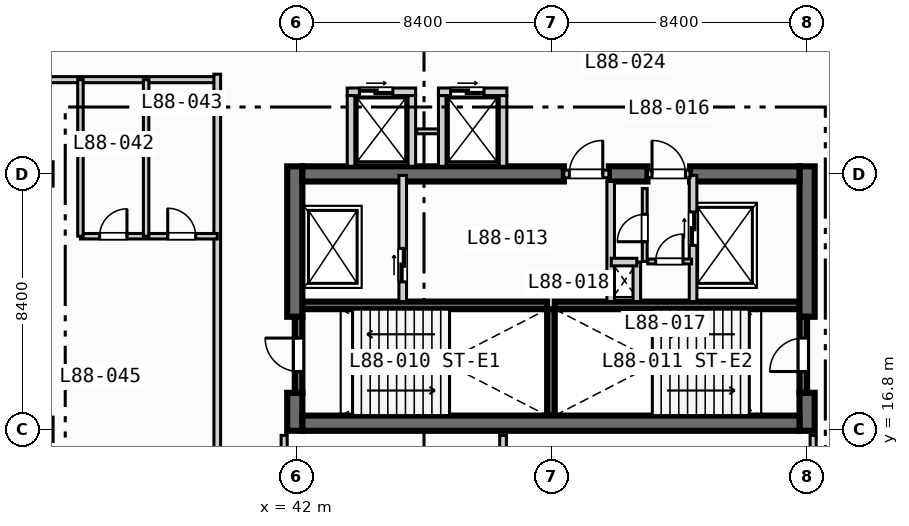
"""IFC4 building model, lengths in metres.
Left out: names, types, materials, properties, quantities, classifications, styles, units other than length and angle.
Written with IfcOpenShell. Run it as: python <this file> out.ifc"""

import sys

from ifc_helpers import new_model, si_unit, direction, frame, frame_2d, origin, place, context, subcontext, project, spatial, rectangle, extrude, element, fill, save


model = new_model("IFC4")
c1 = context("Model", 3, precision=1e-05, world=origin(), true_north=direction((0.0, 1.0)))
c2 = subcontext(c1, "Body", "Model", "MODEL_VIEW")
j1 = project(units=[si_unit("LENGTHUNIT", "METRE"), si_unit("PLANEANGLEUNIT", "RADIAN")], contexts=[c1])
p1 = place(None, origin())
s1 = spatial("IfcSite", under=j1, at=p1, CompositionType="ELEMENT")
p2 = place(p1, origin())
s2 = spatial("IfcBuilding", under=s1, at=p2, CompositionType="ELEMENT")
p3 = place(p2, frame((0.0, 0.0, 355.4)))
s3 = spatial("IfcBuildingStorey", under=s2, at=p3, CompositionType="ELEMENT", Elevation=355.4)
for number, where, z_axis, x_axis in (
    (1, (42.2, 20.875, 0.0), (0.0, 0.0, 1.0), (1.0, 0.0, 0.0)),
    (2, (50.5, 20.875, 0.0), (0.0, 0.0, 1.0), (1.0, 0.0, 0.0)),
):
    element("IfcWall", number, at=place(p3, frame(where, z_axis=z_axis, x_axis=x_axis)), inside=s3, PredefinedType="SOLIDWALL", context=c2, shape_type="SweptSolid", body=[
        extrude(rectangle(XDim=8.05, YDim=0.25, at=frame_2d((4.025, 0.0))), origin(), (0.0, 0.0, 1.0), 3.97),
    ])
p4 = place(p3, frame((50.375, 17.25, 0.0), z_axis=(0.0, 0.0, 1.0), x_axis=(0.0, 1.0, 0.0)))
e3 = element("IfcWall", 3, at=p4, inside=s3, PredefinedType="SOLIDWALL", context=c2, shape_type="SweptSolid", body=[
    extrude(rectangle(XDim=3.5, YDim=0.25, at=frame_2d((1.75, 0.0))), origin(), (0.0, 0.0, 1.0), 3.97),
])
p5 = place(p3, frame((41.95, 16.75, 0.0), z_axis=(0.0, 0.0, 1.0), x_axis=(0.0, 1.0, 0.0)))
e4 = element("IfcWall", 4, at=p5, inside=s3, PredefinedType="SHEAR", context=c2, shape_type="SweptSolid", body=[
    extrude(rectangle(XDim=1.25, YDim=0.5, at=frame_2d((0.625, 0.0))), origin(), (0.0, 0.0, 1.0), 3.97),
])
p6 = place(p3, frame((41.95, 20.5, 0.0), z_axis=(0.0, 0.0, 1.0), x_axis=(0.0, 1.0, 0.0)))
e5 = element("IfcWall", 5, at=p6, inside=s3, PredefinedType="SHEAR", context=c2, shape_type="SweptSolid", body=[
    extrude(rectangle(XDim=4.95, YDim=0.5, at=frame_2d((2.475, 0.0))), origin(), (0.0, 0.0, 1.0), 3.97),
])
p7 = place(p3, frame((58.8, 16.75, 0.0), z_axis=(0.0, 0.0, 1.0), x_axis=(0.0, 1.0, 0.0)))
e6 = element("IfcWall", 6, at=p7, inside=s3, PredefinedType="SHEAR", context=c2, shape_type="SweptSolid", body=[
    extrude(rectangle(XDim=1.25, YDim=0.5, at=frame_2d((0.625, 0.0))), origin(), (0.0, 0.0, 1.0), 3.97),
])
p8 = place(p3, frame((58.8, 20.5, 0.0), z_axis=(0.0, 0.0, 1.0), x_axis=(0.0, 1.0, 0.0)))
e7 = element("IfcWall", 7, at=p8, inside=s3, PredefinedType="SHEAR", context=c2, shape_type="SweptSolid", body=[
    extrude(rectangle(XDim=4.95, YDim=0.5, at=frame_2d((2.475, 0.0))), origin(), (0.0, 0.0, 1.0), 3.97),
])
p9 = place(p3, frame((42.2, 17.0, 0.0), z_axis=(0.0, 0.0, 1.0), x_axis=(1.0, 0.0, 0.0)))
e8 = element("IfcWall", 8, at=p9, inside=s3, PredefinedType="SHEAR", context=c2, shape_type="SweptSolid", body=[
    extrude(rectangle(XDim=16.35, YDim=0.5, at=frame_2d((8.175, 0.0))), origin(), (0.0, 0.0, 1.0), 3.97),
])
p10 = place(p3, frame((42.2, 25.2, 0.0), z_axis=(0.0, 0.0, 1.0), x_axis=(1.0, 0.0, 0.0)))
e9 = element("IfcWall", 9, at=p10, inside=s3, PredefinedType="SHEAR", context=c2, shape_type="SweptSolid", body=[
    extrude(rectangle(XDim=8.6, YDim=0.5, at=frame_2d((4.3, 0.0))), origin(), (0.0, 0.0, 1.0), 3.97),
])
p11 = place(p3, frame((52.28, 25.2, 0.0), z_axis=(0.0, 0.0, 1.0), x_axis=(1.0, 0.0, 0.0)))
e10 = element("IfcWall", 10, at=p11, inside=s3, PredefinedType="SHEAR", context=c2, shape_type="SweptSolid", body=[
    extrude(rectangle(XDim=1.27, YDim=0.5, at=frame_2d((0.635, 0.0))), origin(), (0.0, 0.0, 1.0), 3.97),
])
p12 = place(p3, frame((54.95, 25.2, 0.0), z_axis=(0.0, 0.0, 1.0), x_axis=(1.0, 0.0, 0.0)))
e11 = element("IfcWall", 11, at=p12, inside=s3, PredefinedType="SHEAR", context=c2, shape_type="SweptSolid", body=[
    extrude(rectangle(XDim=3.6, YDim=0.5, at=frame_2d((1.8, 0.0))), origin(), (0.0, 0.0, 1.0), 3.97),
])
p13 = place(p3, frame((42.075, 18.0, 0.0), z_axis=(0.0, 0.0, 1.0), x_axis=(0.0, 1.0, 0.0)))
e12 = element("IfcWall", 12, at=p13, inside=s3, PredefinedType="SOLIDWALL", context=c2, shape_type="SweptSolid", body=[
    extrude(rectangle(XDim=2.5, YDim=0.25, at=frame_2d((1.25, 0.0))), origin(), (0.0, 0.0, 1.0), 3.97),
])
p14 = place(p13, frame((0.7, 0.0, 0.0)))
e13 = element("IfcOpeningElement", 13, at=p14, cuts=e12, PredefinedType="OPENING", context=c2, shape_type="SweptSolid", body=[
    extrude(rectangle(XDim=1.1, YDim=2.15, at=frame_2d((0.55, 1.075))), frame((0.0, 0.135, 0.0), z_axis=(0.0, -1.0, 0.0), x_axis=(1.0, 0.0, 0.0)), (0.0, 0.0, 1.0), 0.27),
])
p15 = place(p3, frame((58.675, 18.0, 0.0), z_axis=(0.0, 0.0, 1.0), x_axis=(0.0, 1.0, 0.0)))
e14 = element("IfcWall", 14, at=p15, inside=s3, PredefinedType="SOLIDWALL", context=c2, shape_type="SweptSolid", body=[
    extrude(rectangle(XDim=2.5, YDim=0.25, at=frame_2d((1.25, 0.0))), origin(), (0.0, 0.0, 1.0), 3.97),
])
p16 = place(p15, frame((0.7, 0.0, 0.0)))
e15 = element("IfcOpeningElement", 15, at=p16, cuts=e14, PredefinedType="OPENING", context=c2, shape_type="SweptSolid", body=[
    extrude(rectangle(XDim=1.1, YDim=2.15, at=frame_2d((0.55, 1.075))), frame((0.0, 0.135, 0.0), z_axis=(0.0, -1.0, 0.0), x_axis=(1.0, 0.0, 0.0)), (0.0, 0.0, 1.0), 0.27),
])
p17 = place(p3, frame((45.5, 21.0, 0.0), z_axis=(0.0, 0.0, 1.0), x_axis=(0.0, 1.0, 0.0)))
e16 = element("IfcWall", 16, at=p17, inside=s3, PredefinedType="SOLIDWALL", context=c2, shape_type="SweptSolid", body=[
    extrude(rectangle(XDim=4.15, YDim=0.25, at=frame_2d((2.075, 0.0))), origin(), (0.0, 0.0, 1.0), 3.97),
])
p18 = place(p17, frame((0.65, 0.0, 0.0)))
e17 = element("IfcOpeningElement", 17, at=p18, cuts=e16, PredefinedType="OPENING", context=c2, shape_type="SweptSolid", body=[
    extrude(rectangle(XDim=1.1, YDim=2.15, at=frame_2d((0.55, 1.075))), frame((0.0, 0.135, 0.0), z_axis=(0.0, -1.0, 0.0), x_axis=(1.0, 0.0, 0.0)), (0.0, 0.0, 1.0), 0.27),
])
p19 = place(p3, frame((50.8, 25.2, 0.0), z_axis=(0.0, 0.0, 1.0), x_axis=(1.0, 0.0, 0.0)))
e18 = element("IfcWall", 18, at=p19, inside=s3, PredefinedType="SOLIDWALL", context=c2, shape_type="SweptSolid", body=[
    extrude(rectangle(XDim=1.48, YDim=0.25, at=frame_2d((0.74, 0.0))), origin(), (0.0, 0.0, 1.0), 3.97),
])
p20 = place(p19, frame((0.18, 0.0, 0.0)))
e19 = element("IfcOpeningElement", 19, at=p20, cuts=e18, PredefinedType="OPENING", context=c2, shape_type="SweptSolid", body=[
    extrude(rectangle(XDim=1.1, YDim=2.15, at=frame_2d((0.55, 1.075))), frame((0.0, 0.135, 0.0), z_axis=(0.0, -1.0, 0.0), x_axis=(1.0, 0.0, 0.0)), (0.0, 0.0, 1.0), 0.27),
])
p21 = place(p3, frame((52.34, 21.0, 0.0), z_axis=(0.0, 0.0, 1.0), x_axis=(0.0, 1.0, 0.0)))
e20 = element("IfcWall", 20, at=p21, inside=s3, PredefinedType="SOLIDWALL", context=c2, shape_type="SweptSolid", body=[
    extrude(rectangle(XDim=3.95, YDim=0.25, at=frame_2d((1.975, 0.0))), origin(), (0.0, 0.0, 1.0), 3.97),
])
p22 = place(p3, frame((55.05, 21.0, 0.0), z_axis=(0.0, 0.0, 1.0), x_axis=(0.0, 1.0, 0.0)))
e21 = element("IfcWall", 21, at=p22, inside=s3, PredefinedType="SOLIDWALL", context=c2, shape_type="SweptSolid", body=[
    extrude(rectangle(XDim=4.15, YDim=0.25, at=frame_2d((2.075, 0.0))), origin(), (0.0, 0.0, 1.0), 3.97),
])
p23 = place(p22, frame((1.85, 0.0, 0.0)))
e22 = element("IfcOpeningElement", 22, at=p23, cuts=e21, PredefinedType="OPENING", context=c2, shape_type="SweptSolid", body=[
    extrude(rectangle(XDim=1.1, YDim=2.15, at=frame_2d((0.55, 1.075))), frame((0.0, 0.135, 0.0), z_axis=(0.0, -1.0, 0.0), x_axis=(1.0, 0.0, 0.0)), (0.0, 0.0, 1.0), 0.27),
])
p24 = place(p3, frame((53.55, 25.2, 0.0), z_axis=(0.0, 0.0, 1.0), x_axis=(1.0, 0.0, 0.0)))
e23 = element("IfcWall", 23, at=p24, inside=s3, PredefinedType="SOLIDWALL", context=c2, shape_type="SweptSolid", body=[
    extrude(rectangle(XDim=1.4, YDim=0.25, at=frame_2d((0.7, 0.0))), origin(), (0.0, 0.0, 1.0), 3.97),
])
p25 = place(p24, frame((0.15, 0.0, 0.0)))
e24 = element("IfcOpeningElement", 24, at=p25, cuts=e23, PredefinedType="OPENING", context=c2, shape_type="SweptSolid", body=[
    extrude(rectangle(XDim=1.1, YDim=2.15, at=frame_2d((0.55, 1.075))), frame((0.0, 0.135, 0.0), z_axis=(0.0, -1.0, 0.0), x_axis=(1.0, 0.0, 0.0)), (0.0, 0.0, 1.0), 0.27),
])
p26 = place(p3, frame((53.2, 21.0, 0.0), z_axis=(0.0, 0.0, 1.0), x_axis=(0.0, 1.0, 0.0)))
e25 = element("IfcWall", 25, at=p26, inside=s3, PredefinedType="SOLIDWALL", context=c2, shape_type="SweptSolid", body=[
    extrude(rectangle(XDim=1.3, YDim=0.25, at=frame_2d((0.65, 0.0))), origin(), (0.0, 0.0, 1.0), 3.97),
])
p27 = place(p3, frame((52.36, 22.3, 0.0), z_axis=(0.0, 0.0, 1.0), x_axis=(1.0, 0.0, 0.0)))
e26 = element("IfcWall", 26, at=p27, inside=s3, PredefinedType="SOLIDWALL", context=c2, shape_type="SweptSolid", body=[
    extrude(rectangle(XDim=0.84, YDim=0.25, at=frame_2d((0.42, 0.0))), origin(), (0.0, 0.0, 1.0), 3.97),
])
p28 = place(p3, frame((53.56, 22.32, 0.0), z_axis=(0.0, 0.0, 1.0), x_axis=(1.0, 0.0, 0.0)))
e27 = element("IfcWall", 27, at=p28, inside=s3, PredefinedType="PARTITIONING", context=c2, shape_type="SweptSolid", body=[
    extrude(rectangle(XDim=1.44, YDim=0.16, at=frame_2d((0.72, 0.0))), origin(), (0.0, 0.0, 1.0), 3.97),
])
p29 = place(p28, frame((0.26, 0.0, 0.0)))
e28 = element("IfcOpeningElement", 28, at=p29, cuts=e27, PredefinedType="OPENING", context=c2, shape_type="SweptSolid", body=[
    extrude(rectangle(XDim=0.9, YDim=2.1, at=frame_2d((0.45, 1.05))), frame((0.0, 0.09, 0.0), z_axis=(0.0, -1.0, 0.0), x_axis=(1.0, 0.0, 0.0)), (0.0, 0.0, 1.0), 0.18),
])
p30 = place(p3, frame((53.46, 22.32, 0.0), z_axis=(0.0, 0.0, 1.0), x_axis=(0.0, 1.0, 0.0)))
e29 = element("IfcWall", 29, at=p30, inside=s3, PredefinedType="PARTITIONING", context=c2, shape_type="SweptSolid", body=[
    extrude(rectangle(XDim=2.4, YDim=0.16, at=frame_2d((1.2, 0.0))), origin(), (0.0, 0.0, 1.0), 3.97),
])
p31 = place(p30, frame((0.65, 0.0, 0.0)))
e30 = element("IfcOpeningElement", 30, at=p31, cuts=e29, PredefinedType="OPENING", context=c2, shape_type="SweptSolid", body=[
    extrude(rectangle(XDim=0.9, YDim=2.1, at=frame_2d((0.45, 1.05))), frame((0.0, 0.09, 0.0), z_axis=(0.0, -1.0, 0.0), x_axis=(1.0, 0.0, 0.0)), (0.0, 0.0, 1.0), 0.18),
])
p32 = place(p3, frame((43.675, 27.9, 0.0), z_axis=(0.0, 0.0, 1.0), x_axis=(1.0, 0.0, 0.0)))
e31 = element("IfcWall", 31, at=p32, inside=s3, PredefinedType="SOLIDWALL", context=c2, shape_type="SweptSolid", body=[
    extrude(rectangle(XDim=2.25, YDim=0.25, at=frame_2d((1.125, 0.0))), origin(), (0.0, 0.0, 1.0), 3.97),
])
p33 = place(p32, frame((0.4, 0.0, 0.0)))
e32 = element("IfcOpeningElement", 32, at=p33, cuts=e31, PredefinedType="OPENING", context=c2, shape_type="SweptSolid", body=[
    extrude(rectangle(XDim=1.1, YDim=2.15, at=frame_2d((0.55, 1.075))), frame((0.0, 0.135, 0.0), z_axis=(0.0, -1.0, 0.0), x_axis=(1.0, 0.0, 0.0)), (0.0, 0.0, 1.0), 0.27),
])
for number, where, z_axis, x_axis in (
    (33, (43.8, 25.45, 0.0), (0.0, 0.0, 1.0), (0.0, 1.0, 0.0)),
    (34, (45.8, 25.45, 0.0), (0.0, 0.0, 1.0), (0.0, 1.0, 0.0)),
):
    element("IfcWall", number, at=place(p3, frame(where, z_axis=z_axis, x_axis=x_axis)), inside=s3, PredefinedType="SOLIDWALL", context=c2, shape_type="SweptSolid", body=[
        extrude(rectangle(XDim=2.325, YDim=0.25, at=frame_2d((1.163, 0.0))), origin(), (0.0, 0.0, 1.0), 3.97),
    ])
p34 = place(p3, frame((45.96, 26.6, 0.0), z_axis=(0.0, 0.0, 1.0), x_axis=(1.0, 0.0, 0.0)))
e35 = element("IfcWall", 35, at=p34, inside=s3, PredefinedType="PARTITIONING", context=c2, shape_type="SweptSolid", body=[
    extrude(rectangle(XDim=0.88, YDim=0.16, at=frame_2d((0.44, 0.0))), origin(), (0.0, 0.0, 1.0), 3.97),
])
p35 = place(p3, frame((46.675, 27.9, 0.0), z_axis=(0.0, 0.0, 1.0), x_axis=(1.0, 0.0, 0.0)))
e36 = element("IfcWall", 36, at=p35, inside=s3, PredefinedType="SOLIDWALL", context=c2, shape_type="SweptSolid", body=[
    extrude(rectangle(XDim=2.25, YDim=0.25, at=frame_2d((1.125, 0.0))), origin(), (0.0, 0.0, 1.0), 3.97),
])
p36 = place(p35, frame((0.4, 0.0, 0.0)))
e37 = element("IfcOpeningElement", 37, at=p36, cuts=e36, PredefinedType="OPENING", context=c2, shape_type="SweptSolid", body=[
    extrude(rectangle(XDim=1.1, YDim=2.15, at=frame_2d((0.55, 1.075))), frame((0.0, 0.135, 0.0), z_axis=(0.0, -1.0, 0.0), x_axis=(1.0, 0.0, 0.0)), (0.0, 0.0, 1.0), 0.27),
])
for number, where, z_axis, x_axis in (
    (38, (46.8, 25.45, 0.0), (0.0, 0.0, 1.0), (0.0, 1.0, 0.0)),
    (39, (48.8, 25.45, 0.0), (0.0, 0.0, 1.0), (0.0, 1.0, 0.0)),
):
    element("IfcWall", number, at=place(p3, frame(where, z_axis=z_axis, x_axis=x_axis)), inside=s3, PredefinedType="SOLIDWALL", context=c2, shape_type="SweptSolid", body=[
        extrude(rectangle(XDim=2.325, YDim=0.25, at=frame_2d((1.163, 0.0))), origin(), (0.0, 0.0, 1.0), 3.97),
    ])
p37 = place(p3, frame((41.6, 8.65, 0.0), z_axis=(0.0, 0.0, 1.0), x_axis=(0.0, 1.0, 0.0)))
e40 = element("IfcWall", 40, at=p37, inside=s3, PredefinedType="PARTITIONING", context=c2, shape_type="SweptSolid", body=[
    extrude(rectangle(XDim=7.95, YDim=0.2, at=frame_2d((3.975, 0.0))), origin(), (0.0, 0.0, 1.0), 3.97),
])
p38 = place(p37, frame((2.2, 0.0, 0.0)))
e41 = element("IfcOpeningElement", 41, at=p38, cuts=e40, PredefinedType="OPENING", context=c2, shape_type="SweptSolid", body=[
    extrude(rectangle(XDim=0.92, YDim=2.1, at=frame_2d((0.46, 1.05))), frame((0.0, 0.11, 0.0), z_axis=(0.0, -1.0, 0.0), x_axis=(1.0, 0.0, 0.0)), (0.0, 0.0, 1.0), 0.22),
])
p39 = place(p3, frame((59.0, 8.65, 0.0), z_axis=(0.0, 0.0, 1.0), x_axis=(0.0, 1.0, 0.0)))
e42 = element("IfcWall", 42, at=p39, inside=s3, PredefinedType="PARTITIONING", context=c2, shape_type="SweptSolid", body=[
    extrude(rectangle(XDim=7.95, YDim=0.2, at=frame_2d((3.975, 0.0))), origin(), (0.0, 0.0, 1.0), 3.431),
])
p40 = place(p39, frame((2.2, 0.0, 0.0)))
e43 = element("IfcOpeningElement", 43, at=p40, cuts=e42, PredefinedType="OPENING", context=c2, shape_type="SweptSolid", body=[
    extrude(rectangle(XDim=0.92, YDim=2.1, at=frame_2d((0.46, 1.05))), frame((0.0, 0.11, 0.0), z_axis=(0.0, -1.0, 0.0), x_axis=(1.0, 0.0, 0.0)), (0.0, 0.0, 1.0), 0.22),
])
p41 = place(p3, frame((48.8, 8.65, 0.0), z_axis=(0.0, 0.0, 1.0), x_axis=(0.0, 1.0, 0.0)))
e44 = element("IfcWall", 44, at=p41, inside=s3, PredefinedType="PARTITIONING", context=c2, shape_type="SweptSolid", body=[
    extrude(rectangle(XDim=7.95, YDim=0.22, at=frame_2d((3.975, 0.0))), origin(), (0.0, 0.0, 1.0), 3.97),
])
p42 = place(p3, frame((11.8, 28.3, 0.0), z_axis=(0.0, 0.0, 1.0), x_axis=(1.0, 0.0, 0.0)))
e45 = element("IfcWall", 45, at=p42, inside=s3, PredefinedType="PARTITIONING", context=c2, shape_type="SweptSolid", body=[
    extrude(rectangle(XDim=27.6, YDim=0.2, at=frame_2d((13.8, 0.0))), origin(), (0.0, 0.0, 1.0), 3.97),
])
p43 = place(p42, frame((2.72, 0.0, 0.0)))
e46 = element("IfcOpeningElement", 46, at=p43, cuts=e45, PredefinedType="OPENING", context=c2, shape_type="SweptSolid", body=[
    extrude(rectangle(XDim=1.0, YDim=2.15, at=frame_2d((0.5, 1.075))), frame((0.0, 0.11, 0.0), z_axis=(0.0, -1.0, 0.0), x_axis=(1.0, 0.0, 0.0)), (0.0, 0.0, 1.0), 0.22),
])
p44 = place(p42, frame((11.62, 0.0, 0.0)))
e47 = element("IfcOpeningElement", 47, at=p44, cuts=e45, PredefinedType="OPENING", context=c2, shape_type="SweptSolid", body=[
    extrude(rectangle(XDim=1.0, YDim=2.15, at=frame_2d((0.5, 1.075))), frame((0.0, 0.11, 0.0), z_axis=(0.0, -1.0, 0.0), x_axis=(1.0, 0.0, 0.0)), (0.0, 0.0, 1.0), 0.22),
])
p45 = place(p42, frame((21.02, 0.0, 0.0)))
e48 = element("IfcOpeningElement", 48, at=p45, cuts=e45, PredefinedType="OPENING", context=c2, shape_type="SweptSolid", body=[
    extrude(rectangle(XDim=1.0, YDim=2.15, at=frame_2d((0.5, 1.075))), frame((0.0, 0.11, 0.0), z_axis=(0.0, -1.0, 0.0), x_axis=(1.0, 0.0, 0.0)), (0.0, 0.0, 1.0), 0.22),
])
p46 = place(p3, frame((39.4, 8.6, 0.0), z_axis=(0.0, 0.0, 1.0), x_axis=(0.0, 1.0, 0.0)))
e49 = element("IfcWall", 49, at=p46, inside=s3, PredefinedType="PARTITIONING", context=c2, shape_type="SweptSolid", body=[
    extrude(rectangle(XDim=19.88, YDim=0.22, at=frame_2d((9.94, 0.0))), origin(), (0.0, 0.0, 1.0), 3.97),
])
p47 = place(p3, frame((34.9, 23.15, 0.0), z_axis=(0.0, 0.0, 1.0), x_axis=(1.0, 0.0, 0.0)))
e50 = element("IfcWall", 50, at=p47, inside=s3, PredefinedType="PLUMBINGWALL", context=c2, shape_type="SweptSolid", body=[
    extrude(rectangle(XDim=4.5, YDim=0.18, at=frame_2d((2.25, 0.0))), origin(), (0.0, 0.0, 1.0), 3.97),
])
p48 = place(p47, frame((0.63, 0.0, 0.0)))
e51 = element("IfcOpeningElement", 51, at=p48, cuts=e50, PredefinedType="OPENING", context=c2, shape_type="SweptSolid", body=[
    extrude(rectangle(XDim=0.9, YDim=2.1, at=frame_2d((0.45, 1.05))), frame((0.0, 0.1, 0.0), z_axis=(0.0, -1.0, 0.0), x_axis=(1.0, 0.0, 0.0)), (0.0, 0.0, 1.0), 0.2),
])
p49 = place(p47, frame((2.87, 0.0, 0.0)))
e52 = element("IfcOpeningElement", 52, at=p49, cuts=e50, PredefinedType="OPENING", context=c2, shape_type="SweptSolid", body=[
    extrude(rectangle(XDim=0.92, YDim=2.1, at=frame_2d((0.46, 1.05))), frame((0.0, 0.1, 0.0), z_axis=(0.0, -1.0, 0.0), x_axis=(1.0, 0.0, 0.0)), (0.0, 0.0, 1.0), 0.2),
])
for number, where, z_axis, x_axis in (
    (53, (34.9, 23.15, 0.0), (0.0, 0.0, 1.0), (0.0, 1.0, 0.0)),
    (54, (37.06, 23.15, 0.0), (0.0, 0.0, 1.0), (0.0, 1.0, 0.0)),
):
    element("IfcWall", number, at=place(p3, frame(where, z_axis=z_axis, x_axis=x_axis)), inside=s3, PredefinedType="PLUMBINGWALL", context=c2, shape_type="SweptSolid", body=[
        extrude(rectangle(XDim=5.15, YDim=0.18, at=frame_2d((2.575, 0.0))), origin(), (0.0, 0.0, 1.0), 3.97),
    ])
p50 = place(p14, origin())
e55 = element("IfcDoor", 55, at=p50, inside=s3, OperationType="SINGLE_SWING_RIGHT", PredefinedType="DOOR", context=c2, shape_type="SweptSolid", body=[
    extrude(rectangle(XDim=1.1, YDim=2.15, at=frame_2d((0.55, 1.075))), frame((0.0, 0.025, 0.0), z_axis=(0.0, -1.0, 0.0), x_axis=(1.0, 0.0, 0.0)), (0.0, 0.0, 1.0), 0.05),
])
fill(e13, e55)
p51 = place(p16, origin())
e56 = element("IfcDoor", 56, at=p51, inside=s3, OperationType="SINGLE_SWING_LEFT", PredefinedType="DOOR", context=c2, shape_type="SweptSolid", body=[
    extrude(rectangle(XDim=1.1, YDim=2.15, at=frame_2d((0.55, 1.075))), frame((0.0, 0.025, 0.0), z_axis=(0.0, -1.0, 0.0), x_axis=(1.0, 0.0, 0.0)), (0.0, 0.0, 1.0), 0.05),
])
fill(e15, e56)
p52 = place(p18, origin())
e57 = element("IfcDoor", 57, at=p52, inside=s3, OperationType="SLIDING_TO_LEFT", PredefinedType="DOOR", context=c2, shape_type="SweptSolid", body=[
    extrude(rectangle(XDim=1.1, YDim=2.15, at=frame_2d((0.55, 1.075))), frame((0.0, 0.025, 0.0), z_axis=(0.0, -1.0, 0.0), x_axis=(1.0, 0.0, 0.0)), (0.0, 0.0, 1.0), 0.05),
])
fill(e17, e57)
p53 = place(p20, origin())
e58 = element("IfcDoor", 58, at=p53, inside=s3, OperationType="SINGLE_SWING_RIGHT", PredefinedType="DOOR", context=c2, shape_type="SweptSolid", body=[
    extrude(rectangle(XDim=1.1, YDim=2.15, at=frame_2d((0.55, 1.075))), frame((0.0, 0.025, 0.0), z_axis=(0.0, -1.0, 0.0), x_axis=(1.0, 0.0, 0.0)), (0.0, 0.0, 1.0), 0.05),
])
fill(e19, e58)
p54 = place(p23, origin())
e59 = element("IfcDoor", 59, at=p54, inside=s3, OperationType="SLIDING_TO_LEFT", PredefinedType="DOOR", context=c2, shape_type="SweptSolid", body=[
    extrude(rectangle(XDim=1.1, YDim=2.15, at=frame_2d((0.55, 1.075))), frame((0.0, 0.025, 0.0), z_axis=(0.0, -1.0, 0.0), x_axis=(1.0, 0.0, 0.0)), (0.0, 0.0, 1.0), 0.05),
])
fill(e22, e59)
p55 = place(p25, origin())
e60 = element("IfcDoor", 60, at=p55, inside=s3, OperationType="SINGLE_SWING_LEFT", PredefinedType="DOOR", context=c2, shape_type="SweptSolid", body=[
    extrude(rectangle(XDim=1.1, YDim=2.15, at=frame_2d((0.55, 1.075))), frame((0.0, 0.025, 0.0), z_axis=(0.0, -1.0, 0.0), x_axis=(1.0, 0.0, 0.0)), (0.0, 0.0, 1.0), 0.05),
])
fill(e24, e60)
p56 = place(p29, origin())
e61 = element("IfcDoor", 61, at=p56, inside=s3, OperationType="SINGLE_SWING_RIGHT", PredefinedType="DOOR", context=c2, shape_type="SweptSolid", body=[
    extrude(rectangle(XDim=0.9, YDim=2.1, at=frame_2d((0.45, 1.05))), frame((0.0, 0.025, 0.0), z_axis=(0.0, -1.0, 0.0), x_axis=(1.0, 0.0, 0.0)), (0.0, 0.0, 1.0), 0.05),
])
fill(e28, e61)
p57 = place(p31, origin())
e62 = element("IfcDoor", 62, at=p57, inside=s3, OperationType="SINGLE_SWING_LEFT", PredefinedType="DOOR", context=c2, shape_type="SweptSolid", body=[
    extrude(rectangle(XDim=0.9, YDim=2.1, at=frame_2d((0.45, 1.05))), frame((0.0, 0.025, 0.0), z_axis=(0.0, -1.0, 0.0), x_axis=(1.0, 0.0, 0.0)), (0.0, 0.0, 1.0), 0.05),
])
fill(e30, e62)
p58 = place(p33, origin())
e63 = element("IfcDoor", 63, at=p58, inside=s3, OperationType="SLIDING_TO_LEFT", PredefinedType="DOOR", context=c2, shape_type="SweptSolid", body=[
    extrude(rectangle(XDim=1.1, YDim=2.15, at=frame_2d((0.55, 1.075))), frame((0.0, 0.025, 0.0), z_axis=(0.0, -1.0, 0.0), x_axis=(1.0, 0.0, 0.0)), (0.0, 0.0, 1.0), 0.05),
])
fill(e32, e63)
p59 = place(p36, origin())
e64 = element("IfcDoor", 64, at=p59, inside=s3, OperationType="SLIDING_TO_LEFT", PredefinedType="DOOR", context=c2, shape_type="SweptSolid", body=[
    extrude(rectangle(XDim=1.1, YDim=2.15, at=frame_2d((0.55, 1.075))), frame((0.0, 0.025, 0.0), z_axis=(0.0, -1.0, 0.0), x_axis=(1.0, 0.0, 0.0)), (0.0, 0.0, 1.0), 0.05),
])
fill(e37, e64)
p60 = place(p48, origin())
e65 = element("IfcDoor", 65, at=p60, inside=s3, OperationType="SINGLE_SWING_RIGHT", PredefinedType="DOOR", context=c2, shape_type="SweptSolid", body=[
    extrude(rectangle(XDim=0.9, YDim=2.1, at=frame_2d((0.45, 1.05))), frame((0.0, 0.025, 0.0), z_axis=(0.0, -1.0, 0.0), x_axis=(1.0, 0.0, 0.0)), (0.0, 0.0, 1.0), 0.05),
])
fill(e51, e65)
p61 = place(p49, origin())
e66 = element("IfcDoor", 66, at=p61, inside=s3, OperationType="SINGLE_SWING_LEFT", PredefinedType="DOOR", context=c2, shape_type="SweptSolid", body=[
    extrude(rectangle(XDim=0.92, YDim=2.1, at=frame_2d((0.46, 1.05))), frame((0.0, 0.025, 0.0), z_axis=(0.0, -1.0, 0.0), x_axis=(1.0, 0.0, 0.0)), (0.0, 0.0, 1.0), 0.05),
])
fill(e52, e66)
save(model, sys.argv[1])
